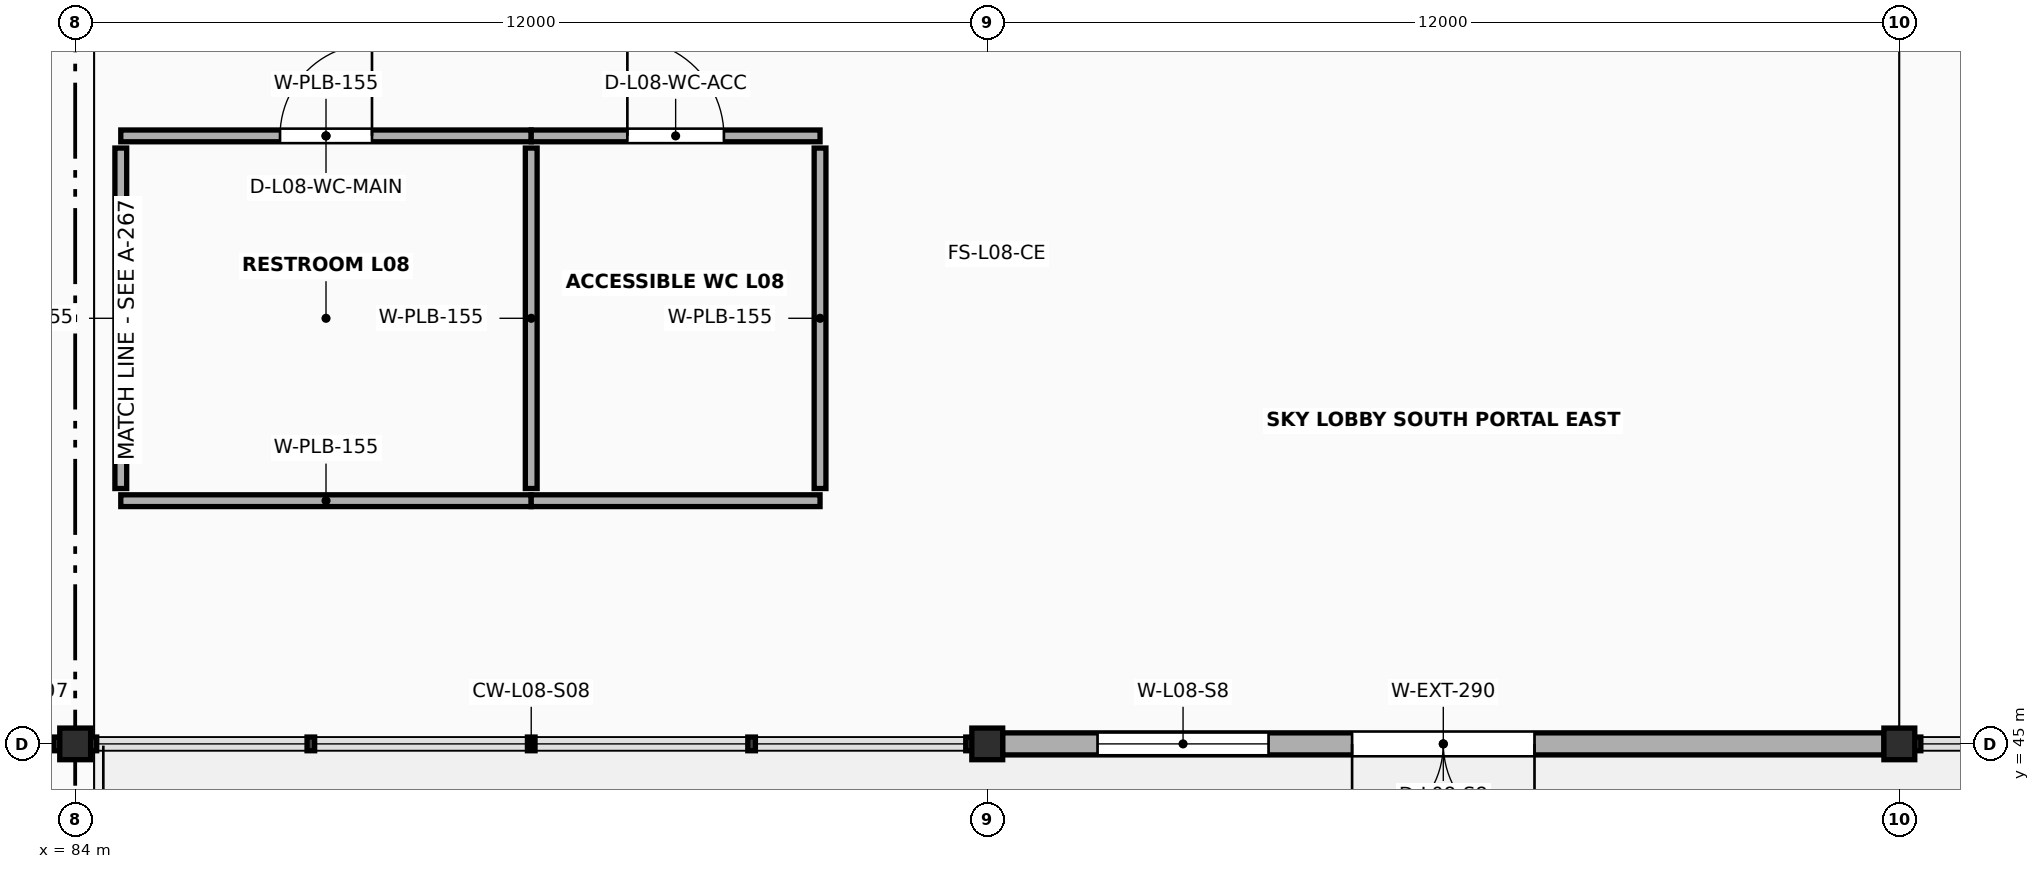
"""IFC4 building model, lengths in metres.
Left out: names, types, materials, properties, quantities, classifications, styles, units other than length and angle.
Written with IfcOpenShell. Run it as: python <this file> out.ifc"""

import sys

from ifc_helpers import new_model, si_unit, direction, frame, frame_2d, origin, origin_2d, place, context, subcontext, project, spatial, rectangle, i_section, extrude, element, fill, save


model = new_model("IFC4")
c1 = context("Model", 3, precision=1e-05, world=origin(), true_north=direction((0.0, 1.0)))
c2 = subcontext(c1, "Body", "Model", "MODEL_VIEW")
j1 = project(units=[si_unit("LENGTHUNIT", "METRE"), si_unit("PLANEANGLEUNIT", "RADIAN")], contexts=[c1])
p1 = place(None, origin())
s1 = spatial("IfcSite", under=j1, at=p1, CompositionType="ELEMENT")
p2 = place(p1, origin())
s2 = spatial("IfcBuilding", under=s1, at=p2, CompositionType="ELEMENT")
p3 = place(p2, frame((0.0, 0.0, 32.4)))
s3 = spatial("IfcBuildingStorey", under=s2, at=p3, CompositionType="ELEMENT", Elevation=32.4)
for number, where, z_axis, x_axis in (
    (1, (84.0, 45.0, 0.0), (0.0, 0.0, 1.0), (1.0, 0.0, 0.0)),
    (2, (96.0, 45.0, 0.0), (0.0, 0.0, 1.0), (1.0, 0.0, 0.0)),
    (3, (108.0, 45.0, 0.0), (0.0, 0.0, 1.0), (1.0, 0.0, 0.0)),
):
    element("IfcColumn", number, at=place(p3, frame(where, z_axis=z_axis, x_axis=x_axis)), inside=s3, PredefinedType="COLUMN", context=c2, shape_type="SweptSolid", body=[
        extrude(i_section(OverallWidth=0.406, OverallDepth=0.416, WebThickness=0.03, FlangeThickness=0.048, FilletRadius=0.018, at=origin_2d()), origin(), (0.0, 0.0, 1.0), 5.2),
    ])
p4 = place(p3, frame((96.201, 45.0, 0.0), z_axis=(0.0, 0.0, 1.0), x_axis=(1.0, 0.0, 0.0)))
e4 = element("IfcWall", 4, at=p4, inside=s3, PredefinedType="SOLIDWALL", context=c2, shape_type="SweptSolid", body=[
    extrude(rectangle(XDim=11.598, YDim=0.29, at=frame_2d((5.799, 0.0))), origin(), (0.0, 0.0, 1.0), 4.1),
])
p5 = place(p4, frame((4.599, 0.0, 0.0)))
e5 = element("IfcOpeningElement", 5, at=p5, cuts=e4, PredefinedType="OPENING", context=c2, shape_type="SweptSolid", body=[
    extrude(rectangle(XDim=2.4, YDim=2.54, at=frame_2d((1.2, 1.27))), frame((0.0, 0.16, 0.0), z_axis=(0.0, -1.0, 0.0), x_axis=(1.0, 0.0, 0.0)), (0.0, 0.0, 1.0), 0.32),
])
p6 = place(p4, frame((1.25, 0.0, 1.95)))
e6 = element("IfcOpeningElement", 6, at=p6, cuts=e4, PredefinedType="OPENING", context=c2, shape_type="SweptSolid", body=[
    extrude(rectangle(XDim=2.25, YDim=0.88, at=frame_2d((1.125, 0.44))), frame((0.0, 0.16, 0.0), z_axis=(0.0, -1.0, 0.0), x_axis=(1.0, 0.0, 0.0)), (0.0, 0.0, 1.0), 0.32),
])
p7 = place(p3, frame((84.6, 48.2, 0.0), z_axis=(0.0, 0.0, 1.0), x_axis=(1.0, 0.0, 0.0)))
e7 = element("IfcWall", 7, at=p7, inside=s3, PredefinedType="PLUMBINGWALL", context=c2, shape_type="SweptSolid", body=[
    extrude(rectangle(XDim=5.4, YDim=0.155, at=frame_2d((2.7, 0.0))), origin(), (0.0, 0.0, 1.0), 2.88),
])
p8 = place(p3, frame((84.6, 53.0, 0.0), z_axis=(0.0, 0.0, 1.0), x_axis=(1.0, 0.0, 0.0)))
e8 = element("IfcWall", 8, at=p8, inside=s3, PredefinedType="PLUMBINGWALL", context=c2, shape_type="SweptSolid", body=[
    extrude(rectangle(XDim=5.4, YDim=0.155, at=frame_2d((2.7, 0.0))), origin(), (0.0, 0.0, 1.0), 2.88),
])
p9 = place(p8, frame((2.095, 0.0, 0.0)))
e9 = element("IfcOpeningElement", 9, at=p9, cuts=e8, PredefinedType="OPENING", context=c2, shape_type="SweptSolid", body=[
    extrude(rectangle(XDim=1.21, YDim=2.25, at=frame_2d((0.605, 1.125))), frame((0.0, 0.093, 0.0), z_axis=(0.0, -1.0, 0.0), x_axis=(1.0, 0.0, 0.0)), (0.0, 0.0, 1.0), 0.185),
])
for number, where, z_axis, x_axis in (
    (10, (84.6, 48.36, 0.0), (0.0, 0.0, 1.0), (0.0, 1.0, 0.0)),
    (11, (90.0, 48.36, 0.0), (0.0, 0.0, 1.0), (0.0, 1.0, 0.0)),
):
    element("IfcWall", number, at=place(p3, frame(where, z_axis=z_axis, x_axis=x_axis)), inside=s3, PredefinedType="PLUMBINGWALL", context=c2, shape_type="SweptSolid", body=[
        extrude(rectangle(XDim=4.48, YDim=0.155, at=frame_2d((2.24, 0.0))), origin(), (0.0, 0.0, 1.0), 2.88),
    ])
p10 = place(p3, frame((90.0, 48.2, 0.0), z_axis=(0.0, 0.0, 1.0), x_axis=(1.0, 0.0, 0.0)))
e12 = element("IfcWall", 12, at=p10, inside=s3, PredefinedType="PLUMBINGWALL", context=c2, shape_type="SweptSolid", body=[
    extrude(rectangle(XDim=3.8, YDim=0.155, at=frame_2d((1.9, 0.0))), origin(), (0.0, 0.0, 1.0), 2.88),
])
p11 = place(p3, frame((90.0, 53.0, 0.0), z_axis=(0.0, 0.0, 1.0), x_axis=(1.0, 0.0, 0.0)))
e13 = element("IfcWall", 13, at=p11, inside=s3, PredefinedType="PLUMBINGWALL", context=c2, shape_type="SweptSolid", body=[
    extrude(rectangle(XDim=3.8, YDim=0.155, at=frame_2d((1.9, 0.0))), origin(), (0.0, 0.0, 1.0), 2.88),
])
p12 = place(p11, frame((1.265, 0.0, 0.0)))
e14 = element("IfcOpeningElement", 14, at=p12, cuts=e13, PredefinedType="OPENING", context=c2, shape_type="SweptSolid", body=[
    extrude(rectangle(XDim=1.27, YDim=2.27, at=frame_2d((0.635, 1.135))), frame((0.0, 0.093, 0.0), z_axis=(0.0, -1.0, 0.0), x_axis=(1.0, 0.0, 0.0)), (0.0, 0.0, 1.0), 0.185),
])
p13 = place(p3, frame((93.8, 48.36, 0.0), z_axis=(0.0, 0.0, 1.0), x_axis=(0.0, 1.0, 0.0)))
e15 = element("IfcWall", 15, at=p13, inside=s3, PredefinedType="PLUMBINGWALL", context=c2, shape_type="SweptSolid", body=[
    extrude(rectangle(XDim=4.48, YDim=0.155, at=frame_2d((2.24, 0.0))), origin(), (0.0, 0.0, 1.0), 2.88),
])
p14 = place(p5, origin())
e16 = element("IfcDoor", 16, at=p14, inside=s3, OperationType="DOUBLE_DOOR_SINGLE_SWING", PredefinedType="DOOR", context=c2, shape_type="SweptSolid", body=[
    extrude(rectangle(XDim=2.4, YDim=2.54, at=frame_2d((1.2, 1.27))), frame((0.0, 0.025, 0.0), z_axis=(0.0, -1.0, 0.0), x_axis=(1.0, 0.0, 0.0)), (0.0, 0.0, 1.0), 0.05),
])
fill(e5, e16)
p15 = place(p6, origin())
e17 = element("IfcWindow", 17, at=p15, inside=s3, PartitioningType="DOUBLE_PANEL_VERTICAL", PredefinedType="USERDEFINED", context=c2, shape_type="SweptSolid", body=[
    extrude(rectangle(XDim=2.25, YDim=0.88, at=frame_2d((1.125, 0.44))), frame((0.0, 0.03, 0.0), z_axis=(0.0, -1.0, 0.0), x_axis=(1.0, 0.0, 0.0)), (0.0, 0.0, 1.0), 0.06),
])
fill(e6, e17)
p16 = place(p9, origin())
e18 = element("IfcDoor", 18, at=p16, inside=s3, OperationType="SINGLE_SWING_RIGHT", PredefinedType="DOOR", context=c2, shape_type="SweptSolid", body=[
    extrude(rectangle(XDim=1.21, YDim=2.25, at=frame_2d((0.605, 1.125))), frame((0.0, 0.025, 0.0), z_axis=(0.0, -1.0, 0.0), x_axis=(1.0, 0.0, 0.0)), (0.0, 0.0, 1.0), 0.05),
])
fill(e9, e18)
p17 = place(p12, origin())
e19 = element("IfcDoor", 19, at=p17, inside=s3, OperationType="SINGLE_SWING_LEFT", PredefinedType="DOOR", context=c2, shape_type="SweptSolid", body=[
    extrude(rectangle(XDim=1.27, YDim=2.27, at=frame_2d((0.635, 1.135))), frame((0.0, 0.025, 0.0), z_axis=(0.0, -1.0, 0.0), x_axis=(1.0, 0.0, 0.0)), (0.0, 0.0, 1.0), 0.05),
])
fill(e14, e19)
save(model, sys.argv[1])
